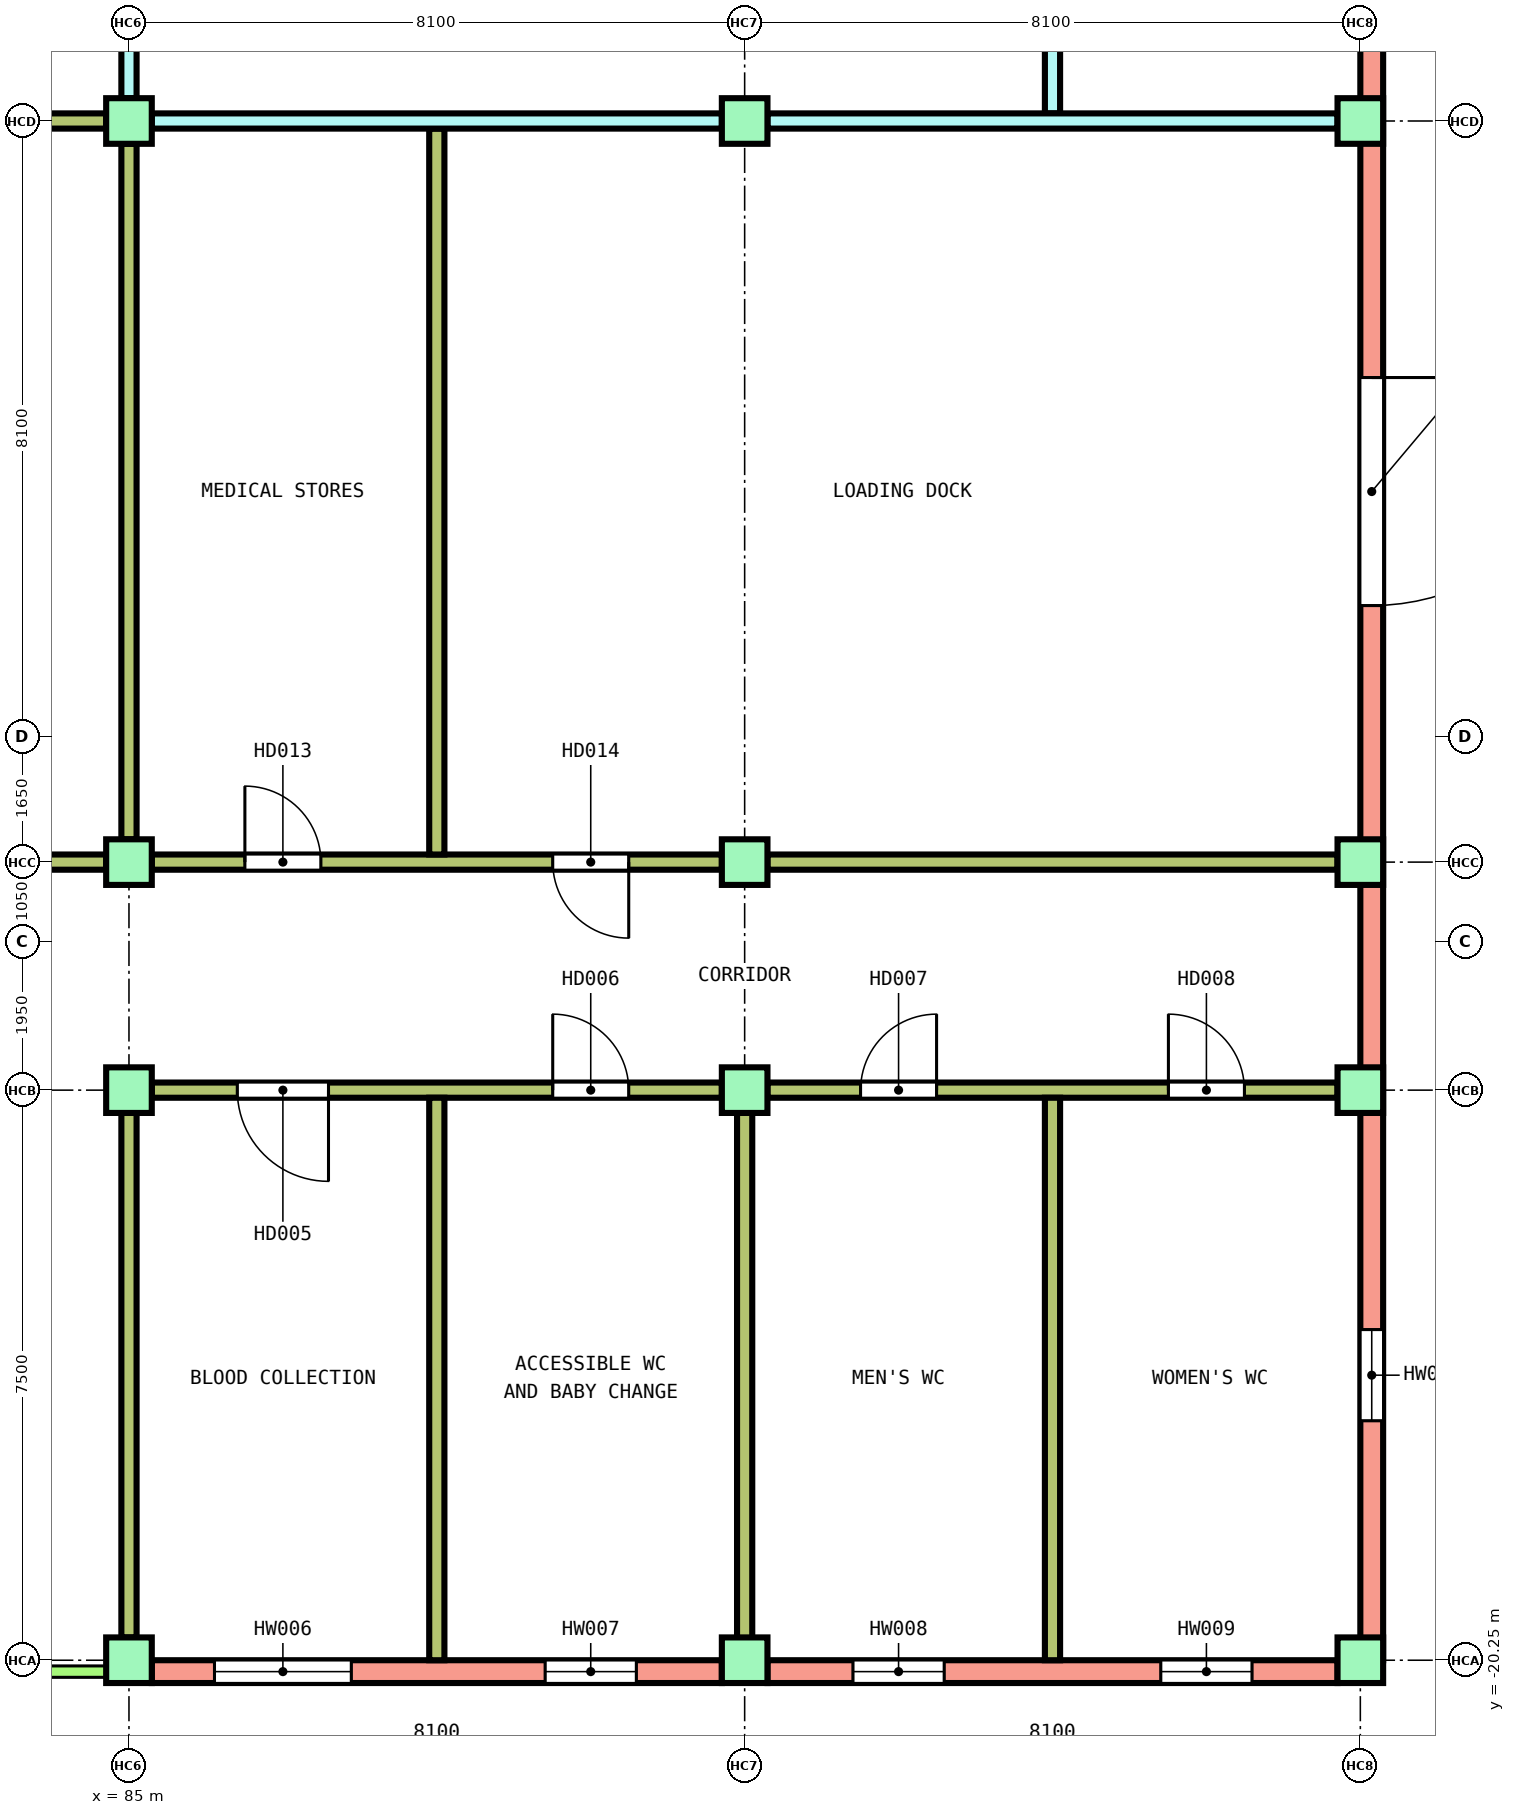
"""IFC4 building model, lengths in metres.
Left out: names, types, materials, properties, quantities, classifications, styles, units other than length and angle.
Written with IfcOpenShell. Run it as: python <this file> out.ifc"""

import sys

from ifc_helpers import new_model, si_unit, direction, frame, frame_2d, origin, origin_2d, place, context, subcontext, project, spatial, rectangle, extrude, element, fill, save


model = new_model("IFC4")
c1 = context("Model", 3, precision=1e-05, world=origin(), true_north=direction((0.0, 1.0)))
c2 = subcontext(c1, "Body", "Model", "MODEL_VIEW")
j1 = project(units=[si_unit("LENGTHUNIT", "METRE"), si_unit("PLANEANGLEUNIT", "RADIAN")], contexts=[c1])
p1 = place(None, origin())
s1 = spatial("IfcSite", under=j1, at=p1, CompositionType="ELEMENT")
p2 = place(p1, origin())
s2 = spatial("IfcBuilding", under=s1, at=p2, CompositionType="ELEMENT")
p3 = place(p2, origin())
s3 = spatial("IfcBuildingStorey", under=s2, at=p3, CompositionType="ELEMENT", Elevation=0.0)
for number, where, z_axis, x_axis in (
    (1, (85.0, -20.25, -0.25), (0.0, 0.0, 1.0), (1.0, 0.0, 0.0)),
    (2, (93.1, -20.25, -0.25), (0.0, 0.0, 1.0), (1.0, 0.0, 0.0)),
    (3, (101.2, -20.25, -0.25), (0.0, 0.0, 1.0), (1.0, 0.0, 0.0)),
    (4, (85.0, -12.75, -0.25), (0.0, 0.0, 1.0), (1.0, 0.0, 0.0)),
    (5, (93.1, -12.75, -0.25), (0.0, 0.0, 1.0), (1.0, 0.0, 0.0)),
    (6, (101.2, -12.75, -0.25), (0.0, 0.0, 1.0), (1.0, 0.0, 0.0)),
    (7, (85.0, -9.75, -0.25), (0.0, 0.0, 1.0), (1.0, 0.0, 0.0)),
    (8, (93.1, -9.75, -0.25), (0.0, 0.0, 1.0), (1.0, 0.0, 0.0)),
    (9, (101.2, -9.75, -0.25), (0.0, 0.0, 1.0), (1.0, 0.0, 0.0)),
    (10, (85.0, 0.0, -0.25), (0.0, 0.0, 1.0), (1.0, 0.0, 0.0)),
    (11, (93.1, 0.0, -0.25), (0.0, 0.0, 1.0), (1.0, 0.0, 0.0)),
    (12, (101.2, 0.0, -0.25), (0.0, 0.0, 1.0), (1.0, 0.0, 0.0)),
):
    element("IfcColumn", number, at=place(p3, frame(where, z_axis=z_axis, x_axis=x_axis)), inside=s3, PredefinedType="COLUMN", context=c2, shape_type="SweptSolid", body=[
        extrude(rectangle(XDim=0.6, YDim=0.6, at=origin_2d()), origin(), (0.0, 0.0, 1.0), 5.85),
    ])
p4 = place(p3, frame((85.3, -20.4, 0.0), z_axis=(0.0, 0.0, 1.0), x_axis=(1.0, 0.0, 0.0)))
e13 = element("IfcWall", 13, at=p4, inside=s3, PredefinedType="SOLIDWALL", context=c2, shape_type="SweptSolid", body=[
    extrude(rectangle(XDim=7.5, YDim=0.3, at=frame_2d((3.75, 0.0))), origin(), (0.0, 0.0, 1.0), 4.8),
])
p5 = place(p4, frame((0.825, 0.0, 0.9)))
e14 = element("IfcOpeningElement", 14, at=p5, cuts=e13, PredefinedType="OPENING", context=c2, shape_type="SweptSolid", body=[
    extrude(rectangle(XDim=1.8, YDim=1.8, at=frame_2d((0.9, 0.9))), frame((0.0, 0.16, 0.0), z_axis=(0.0, -1.0, 0.0), x_axis=(1.0, 0.0, 0.0)), (0.0, 0.0, 1.0), 0.32),
])
p6 = place(p4, frame((5.175, 0.0, 1.5)))
e15 = element("IfcOpeningElement", 15, at=p6, cuts=e13, PredefinedType="OPENING", context=c2, shape_type="SweptSolid", body=[
    extrude(rectangle(XDim=1.2, YDim=0.9, at=frame_2d((0.6, 0.45))), frame((0.0, 0.16, 0.0), z_axis=(0.0, -1.0, 0.0), x_axis=(1.0, 0.0, 0.0)), (0.0, 0.0, 1.0), 0.32),
])
p7 = place(p3, frame((93.4, -20.4, 0.0), z_axis=(0.0, 0.0, 1.0), x_axis=(1.0, 0.0, 0.0)))
e16 = element("IfcWall", 16, at=p7, inside=s3, PredefinedType="SOLIDWALL", context=c2, shape_type="SweptSolid", body=[
    extrude(rectangle(XDim=7.5, YDim=0.3, at=frame_2d((3.75, 0.0))), origin(), (0.0, 0.0, 1.0), 4.8),
])
p8 = place(p7, frame((1.125, 0.0, 1.5)))
e17 = element("IfcOpeningElement", 17, at=p8, cuts=e16, PredefinedType="OPENING", context=c2, shape_type="SweptSolid", body=[
    extrude(rectangle(XDim=1.2, YDim=0.9, at=frame_2d((0.6, 0.45))), frame((0.0, 0.16, 0.0), z_axis=(0.0, -1.0, 0.0), x_axis=(1.0, 0.0, 0.0)), (0.0, 0.0, 1.0), 0.32),
])
p9 = place(p7, frame((5.175, 0.0, 1.5)))
e18 = element("IfcOpeningElement", 18, at=p9, cuts=e16, PredefinedType="OPENING", context=c2, shape_type="SweptSolid", body=[
    extrude(rectangle(XDim=1.2, YDim=0.9, at=frame_2d((0.6, 0.45))), frame((0.0, 0.16, 0.0), z_axis=(0.0, -1.0, 0.0), x_axis=(1.0, 0.0, 0.0)), (0.0, 0.0, 1.0), 0.32),
])
p10 = place(p3, frame((85.3, -12.75, 0.0), z_axis=(0.0, 0.0, 1.0), x_axis=(1.0, 0.0, 0.0)))
e19 = element("IfcWall", 19, at=p10, inside=s3, PredefinedType="PARTITIONING", context=c2, shape_type="SweptSolid", body=[
    extrude(rectangle(XDim=7.5, YDim=0.2, at=frame_2d((3.75, 0.0))), origin(), (0.0, 0.0, 1.0), 4.8),
])
p11 = place(p10, frame((1.125, 0.0, 0.0)))
e20 = element("IfcOpeningElement", 20, at=p11, cuts=e19, PredefinedType="OPENING", context=c2, shape_type="SweptSolid", body=[
    extrude(rectangle(XDim=1.2, YDim=2.1, at=frame_2d((0.6, 1.05))), frame((0.0, 0.11, 0.0), z_axis=(0.0, -1.0, 0.0), x_axis=(1.0, 0.0, 0.0)), (0.0, 0.0, 1.0), 0.22),
])
p12 = place(p10, frame((5.275, 0.0, 0.0)))
e21 = element("IfcOpeningElement", 21, at=p12, cuts=e19, PredefinedType="OPENING", context=c2, shape_type="SweptSolid", body=[
    extrude(rectangle(XDim=1.0, YDim=2.1, at=frame_2d((0.5, 1.05))), frame((0.0, 0.11, 0.0), z_axis=(0.0, -1.0, 0.0), x_axis=(1.0, 0.0, 0.0)), (0.0, 0.0, 1.0), 0.22),
])
p13 = place(p3, frame((93.4, -12.75, 0.0), z_axis=(0.0, 0.0, 1.0), x_axis=(1.0, 0.0, 0.0)))
e22 = element("IfcWall", 22, at=p13, inside=s3, PredefinedType="PARTITIONING", context=c2, shape_type="SweptSolid", body=[
    extrude(rectangle(XDim=7.5, YDim=0.2, at=frame_2d((3.75, 0.0))), origin(), (0.0, 0.0, 1.0), 4.8),
])
p14 = place(p13, frame((1.225, 0.0, 0.0)))
e23 = element("IfcOpeningElement", 23, at=p14, cuts=e22, PredefinedType="OPENING", context=c2, shape_type="SweptSolid", body=[
    extrude(rectangle(XDim=1.0, YDim=2.1, at=frame_2d((0.5, 1.05))), frame((0.0, 0.11, 0.0), z_axis=(0.0, -1.0, 0.0), x_axis=(1.0, 0.0, 0.0)), (0.0, 0.0, 1.0), 0.22),
])
p15 = place(p13, frame((5.275, 0.0, 0.0)))
e24 = element("IfcOpeningElement", 24, at=p15, cuts=e22, PredefinedType="OPENING", context=c2, shape_type="SweptSolid", body=[
    extrude(rectangle(XDim=1.0, YDim=2.1, at=frame_2d((0.5, 1.05))), frame((0.0, 0.11, 0.0), z_axis=(0.0, -1.0, 0.0), x_axis=(1.0, 0.0, 0.0)), (0.0, 0.0, 1.0), 0.22),
])
p16 = place(p3, frame((77.2, -9.75, 0.0), z_axis=(0.0, 0.0, 1.0), x_axis=(1.0, 0.0, 0.0)))
e25 = element("IfcWall", 25, at=p16, inside=s3, PredefinedType="PARTITIONING", context=c2, shape_type="SweptSolid", body=[
    extrude(rectangle(XDim=7.5, YDim=0.2, at=frame_2d((3.75, 0.0))), origin(), (0.0, 0.0, 1.0), 4.8),
])
p17 = place(p16, frame((1.125, 0.0, 0.0)))
e26 = element("IfcOpeningElement", 26, at=p17, cuts=e25, PredefinedType="OPENING", context=c2, shape_type="SweptSolid", body=[
    extrude(rectangle(XDim=1.2, YDim=2.1, at=frame_2d((0.6, 1.05))), frame((0.0, 0.11, 0.0), z_axis=(0.0, -1.0, 0.0), x_axis=(1.0, 0.0, 0.0)), (0.0, 0.0, 1.0), 0.22),
])
p18 = place(p3, frame((85.3, -9.75, 0.0), z_axis=(0.0, 0.0, 1.0), x_axis=(1.0, 0.0, 0.0)))
e27 = element("IfcWall", 27, at=p18, inside=s3, PredefinedType="PARTITIONING", context=c2, shape_type="SweptSolid", body=[
    extrude(rectangle(XDim=7.5, YDim=0.2, at=frame_2d((3.75, 0.0))), origin(), (0.0, 0.0, 1.0), 4.8),
])
p19 = place(p18, frame((1.225, 0.0, 0.0)))
e28 = element("IfcOpeningElement", 28, at=p19, cuts=e27, PredefinedType="OPENING", context=c2, shape_type="SweptSolid", body=[
    extrude(rectangle(XDim=1.0, YDim=2.1, at=frame_2d((0.5, 1.05))), frame((0.0, 0.11, 0.0), z_axis=(0.0, -1.0, 0.0), x_axis=(1.0, 0.0, 0.0)), (0.0, 0.0, 1.0), 0.22),
])
p20 = place(p18, frame((5.275, 0.0, 0.0)))
e29 = element("IfcOpeningElement", 29, at=p20, cuts=e27, PredefinedType="OPENING", context=c2, shape_type="SweptSolid", body=[
    extrude(rectangle(XDim=1.0, YDim=2.1, at=frame_2d((0.5, 1.05))), frame((0.0, 0.11, 0.0), z_axis=(0.0, -1.0, 0.0), x_axis=(1.0, 0.0, 0.0)), (0.0, 0.0, 1.0), 0.22),
])
p21 = place(p3, frame((93.4, -9.75, 0.0), z_axis=(0.0, 0.0, 1.0), x_axis=(1.0, 0.0, 0.0)))
e30 = element("IfcWall", 30, at=p21, inside=s3, PredefinedType="PARTITIONING", context=c2, shape_type="SweptSolid", body=[
    extrude(rectangle(XDim=7.5, YDim=0.2, at=frame_2d((3.75, 0.0))), origin(), (0.0, 0.0, 1.0), 4.8),
])
p22 = place(p3, frame((85.0, -19.95, 0.0), z_axis=(0.0, 0.0, 1.0), x_axis=(0.0, 1.0, 0.0)))
e31 = element("IfcWall", 31, at=p22, inside=s3, PredefinedType="PARTITIONING", context=c2, shape_type="SweptSolid", body=[
    extrude(rectangle(XDim=6.9, YDim=0.2, at=frame_2d((3.45, 0.0))), origin(), (0.0, 0.0, 1.0), 4.8),
])
p23 = place(p3, frame((85.0, -9.45, 0.0), z_axis=(0.0, 0.0, 1.0), x_axis=(0.0, 1.0, 0.0)))
e32 = element("IfcWall", 32, at=p23, inside=s3, PredefinedType="PARTITIONING", context=c2, shape_type="SweptSolid", body=[
    extrude(rectangle(XDim=9.15, YDim=0.2, at=frame_2d((4.575, 0.0))), origin(), (0.0, 0.0, 1.0), 4.8),
])
p24 = place(p3, frame((85.0, 0.3, 0.0), z_axis=(0.0, 0.0, 1.0), x_axis=(0.0, 1.0, 0.0)))
e33 = element("IfcWall", 33, at=p24, inside=s3, PredefinedType="SOLIDWALL", context=c2, shape_type="SweptSolid", body=[
    extrude(rectangle(XDim=9.15, YDim=0.2, at=frame_2d((4.575, 0.0))), origin(), (0.0, 0.0, 1.0), 4.8),
])
p25 = place(p3, frame((89.05, -20.25, 0.0), z_axis=(0.0, 0.0, 1.0), x_axis=(0.0, 1.0, 0.0)))
e34 = element("IfcWall", 34, at=p25, inside=s3, PredefinedType="PARTITIONING", context=c2, shape_type="SweptSolid", body=[
    extrude(rectangle(XDim=7.4, YDim=0.2, at=frame_2d((3.7, 0.0))), origin(), (0.0, 0.0, 1.0), 4.8),
])
p26 = place(p3, frame((89.05, -9.65, 0.0), z_axis=(0.0, 0.0, 1.0), x_axis=(0.0, 1.0, 0.0)))
e35 = element("IfcWall", 35, at=p26, inside=s3, PredefinedType="PARTITIONING", context=c2, shape_type="SweptSolid", body=[
    extrude(rectangle(XDim=9.55, YDim=0.2, at=frame_2d((4.775, 0.0))), origin(), (0.0, 0.0, 1.0), 4.8),
])
p27 = place(p3, frame((93.1, -20.25, 0.0), z_axis=(0.0, 0.0, 1.0), x_axis=(0.0, 1.0, 0.0)))
e36 = element("IfcWall", 36, at=p27, inside=s3, PredefinedType="PARTITIONING", context=c2, shape_type="SweptSolid", body=[
    extrude(rectangle(XDim=7.5, YDim=0.2, at=frame_2d((3.75, 0.0))), origin(), (0.0, 0.0, 1.0), 4.8),
])
p28 = place(p3, frame((97.15, -20.25, 0.0), z_axis=(0.0, 0.0, 1.0), x_axis=(0.0, 1.0, 0.0)))
e37 = element("IfcWall", 37, at=p28, inside=s3, PredefinedType="PARTITIONING", context=c2, shape_type="SweptSolid", body=[
    extrude(rectangle(XDim=7.4, YDim=0.2, at=frame_2d((3.7, 0.0))), origin(), (0.0, 0.0, 1.0), 4.8),
])
p29 = place(p3, frame((97.15, 0.1, 0.0), z_axis=(0.0, 0.0, 1.0), x_axis=(0.0, 1.0, 0.0)))
e38 = element("IfcWall", 38, at=p29, inside=s3, PredefinedType="SOLIDWALL", context=c2, shape_type="SweptSolid", body=[
    extrude(rectangle(XDim=9.55, YDim=0.2, at=frame_2d((4.775, 0.0))), origin(), (0.0, 0.0, 1.0), 4.8),
])
p30 = place(p3, frame((101.35, 20.25, 0.0), z_axis=(0.0, 0.0, 1.0), x_axis=(0.0, -1.0, 0.0)))
e39 = element("IfcWall", 39, at=p30, inside=s3, PredefinedType="SOLIDWALL", context=c2, shape_type="SweptSolid", body=[
    extrude(rectangle(XDim=40.5, YDim=0.3, at=frame_2d((20.25, 0.0))), origin(), (0.0, 0.0, 1.0), 4.8),
])
p31 = place(p30, frame((5.73, 0.0, 0.0)))
e40 = element("IfcOpeningElement", 40, at=p31, cuts=e39, PredefinedType="OPENING", context=c2, shape_type="SweptSolid", body=[
    extrude(rectangle(XDim=1.2, YDim=2.1, at=frame_2d((0.6, 1.05))), frame((0.0, 0.16, 0.0), z_axis=(0.0, -1.0, 0.0), x_axis=(1.0, 0.0, 0.0)), (0.0, 0.0, 1.0), 0.32),
])
p32 = place(p30, frame((23.625, 0.0, 0.0)))
e41 = element("IfcOpeningElement", 41, at=p32, cuts=e39, PredefinedType="OPENING", context=c2, shape_type="SweptSolid", body=[
    extrude(rectangle(XDim=3.0, YDim=3.0, at=frame_2d((1.5, 1.5))), frame((0.0, 0.16, 0.0), z_axis=(0.0, -1.0, 0.0), x_axis=(1.0, 0.0, 0.0)), (0.0, 0.0, 1.0), 0.32),
])
p33 = place(p30, frame((36.15, 0.0, 1.5)))
e42 = element("IfcOpeningElement", 42, at=p33, cuts=e39, PredefinedType="OPENING", context=c2, shape_type="SweptSolid", body=[
    extrude(rectangle(XDim=1.2, YDim=0.9, at=frame_2d((0.6, 0.45))), frame((0.0, 0.16, 0.0), z_axis=(0.0, -1.0, 0.0), x_axis=(1.0, 0.0, 0.0)), (0.0, 0.0, 1.0), 0.32),
])
p34 = place(p30, frame((14.775, 0.0, 1.5)))
e43 = element("IfcOpeningElement", 43, at=p34, cuts=e39, PredefinedType="OPENING", context=c2, shape_type="SweptSolid", body=[
    extrude(rectangle(XDim=1.2, YDim=0.9, at=frame_2d((0.6, 0.45))), frame((0.0, 0.16, 0.0), z_axis=(0.0, -1.0, 0.0), x_axis=(1.0, 0.0, 0.0)), (0.0, 0.0, 1.0), 0.32),
])
p35 = place(p3, frame((77.2, 0.0, 0.0), z_axis=(0.0, 0.0, 1.0), x_axis=(1.0, 0.0, 0.0)))
e44 = element("IfcWall", 44, at=p35, inside=s3, PredefinedType="PARTITIONING", context=c2, shape_type="SweptSolid", body=[
    extrude(rectangle(XDim=7.5, YDim=0.2, at=frame_2d((3.75, 0.0))), origin(), (0.0, 0.0, 1.0), 4.8),
])
for number, where, z_axis, x_axis in (
    (45, (85.3, 0.0, 0.0), (0.0, 0.0, 1.0), (1.0, 0.0, 0.0)),
    (46, (93.4, 0.0, 0.0), (0.0, 0.0, 1.0), (1.0, 0.0, 0.0)),
):
    element("IfcWall", number, at=place(p3, frame(where, z_axis=z_axis, x_axis=x_axis)), inside=s3, PredefinedType="SOLIDWALL", context=c2, shape_type="SweptSolid", body=[
        extrude(rectangle(XDim=7.5, YDim=0.2, at=frame_2d((3.75, 0.0))), origin(), (0.0, 0.0, 1.0), 4.8),
    ])
p36 = place(p11, origin())
e47 = element("IfcDoor", 47, at=p36, inside=s3, OperationType="SINGLE_SWING_RIGHT", PredefinedType="DOOR", context=c2, shape_type="SweptSolid", body=[
    extrude(rectangle(XDim=1.2, YDim=2.1, at=frame_2d((0.6, 1.05))), frame((0.0, 0.025, 0.0), z_axis=(0.0, -1.0, 0.0), x_axis=(1.0, 0.0, 0.0)), (0.0, 0.0, 1.0), 0.05),
])
fill(e20, e47)
p37 = place(p12, origin())
e48 = element("IfcDoor", 48, at=p37, inside=s3, OperationType="SINGLE_SWING_LEFT", PredefinedType="DOOR", context=c2, shape_type="SweptSolid", body=[
    extrude(rectangle(XDim=1.0, YDim=2.1, at=frame_2d((0.5, 1.05))), frame((0.0, 0.025, 0.0), z_axis=(0.0, -1.0, 0.0), x_axis=(1.0, 0.0, 0.0)), (0.0, 0.0, 1.0), 0.05),
])
fill(e21, e48)
p38 = place(p14, origin())
e49 = element("IfcDoor", 49, at=p38, inside=s3, OperationType="SINGLE_SWING_RIGHT", PredefinedType="DOOR", context=c2, shape_type="SweptSolid", body=[
    extrude(rectangle(XDim=1.0, YDim=2.1, at=frame_2d((0.5, 1.05))), frame((0.0, 0.025, 0.0), z_axis=(0.0, -1.0, 0.0), x_axis=(1.0, 0.0, 0.0)), (0.0, 0.0, 1.0), 0.05),
])
fill(e23, e49)
p39 = place(p15, origin())
e50 = element("IfcDoor", 50, at=p39, inside=s3, OperationType="SINGLE_SWING_LEFT", PredefinedType="DOOR", context=c2, shape_type="SweptSolid", body=[
    extrude(rectangle(XDim=1.0, YDim=2.1, at=frame_2d((0.5, 1.05))), frame((0.0, 0.025, 0.0), z_axis=(0.0, -1.0, 0.0), x_axis=(1.0, 0.0, 0.0)), (0.0, 0.0, 1.0), 0.05),
])
fill(e24, e50)
p40 = place(p19, origin())
e51 = element("IfcDoor", 51, at=p40, inside=s3, OperationType="SINGLE_SWING_RIGHT", PredefinedType="DOOR", context=c2, shape_type="SweptSolid", body=[
    extrude(rectangle(XDim=1.0, YDim=2.1, at=frame_2d((0.5, 1.05))), frame((0.0, 0.025, 0.0), z_axis=(0.0, -1.0, 0.0), x_axis=(1.0, 0.0, 0.0)), (0.0, 0.0, 1.0), 0.05),
])
fill(e28, e51)
p41 = place(p20, origin())
e52 = element("IfcDoor", 52, at=p41, inside=s3, OperationType="SINGLE_SWING_LEFT", PredefinedType="DOOR", context=c2, shape_type="SweptSolid", body=[
    extrude(rectangle(XDim=1.0, YDim=2.1, at=frame_2d((0.5, 1.05))), frame((0.0, 0.025, 0.0), z_axis=(0.0, -1.0, 0.0), x_axis=(1.0, 0.0, 0.0)), (0.0, 0.0, 1.0), 0.05),
])
fill(e29, e52)
p42 = place(p32, origin())
e53 = element("IfcDoor", 53, at=p42, inside=s3, OperationType="ROLLINGUP", PredefinedType="DOOR", context=c2, shape_type="SweptSolid", body=[
    extrude(rectangle(XDim=3.0, YDim=3.0, at=frame_2d((1.5, 1.5))), frame((0.0, 0.025, 0.0), z_axis=(0.0, -1.0, 0.0), x_axis=(1.0, 0.0, 0.0)), (0.0, 0.0, 1.0), 0.05),
])
fill(e41, e53)
p43 = place(p5, origin())
e54 = element("IfcWindow", 54, at=p43, inside=s3, PartitioningType="SINGLE_PANEL", PredefinedType="WINDOW", context=c2, shape_type="SweptSolid", body=[
    extrude(rectangle(XDim=1.8, YDim=1.8, at=frame_2d((0.9, 0.9))), frame((0.0, 0.03, 0.0), z_axis=(0.0, -1.0, 0.0), x_axis=(1.0, 0.0, 0.0)), (0.0, 0.0, 1.0), 0.06),
])
fill(e14, e54)
p44 = place(p6, origin())
e55 = element("IfcWindow", 55, at=p44, inside=s3, PartitioningType="SINGLE_PANEL", PredefinedType="WINDOW", context=c2, shape_type="SweptSolid", body=[
    extrude(rectangle(XDim=1.2, YDim=0.9, at=frame_2d((0.6, 0.45))), frame((0.0, 0.03, 0.0), z_axis=(0.0, -1.0, 0.0), x_axis=(1.0, 0.0, 0.0)), (0.0, 0.0, 1.0), 0.06),
])
fill(e15, e55)
p45 = place(p8, origin())
e56 = element("IfcWindow", 56, at=p45, inside=s3, PartitioningType="SINGLE_PANEL", PredefinedType="WINDOW", context=c2, shape_type="SweptSolid", body=[
    extrude(rectangle(XDim=1.2, YDim=0.9, at=frame_2d((0.6, 0.45))), frame((0.0, 0.03, 0.0), z_axis=(0.0, -1.0, 0.0), x_axis=(1.0, 0.0, 0.0)), (0.0, 0.0, 1.0), 0.06),
])
fill(e17, e56)
p46 = place(p9, origin())
e57 = element("IfcWindow", 57, at=p46, inside=s3, PartitioningType="SINGLE_PANEL", PredefinedType="WINDOW", context=c2, shape_type="SweptSolid", body=[
    extrude(rectangle(XDim=1.2, YDim=0.9, at=frame_2d((0.6, 0.45))), frame((0.0, 0.03, 0.0), z_axis=(0.0, -1.0, 0.0), x_axis=(1.0, 0.0, 0.0)), (0.0, 0.0, 1.0), 0.06),
])
fill(e18, e57)
p47 = place(p33, origin())
e58 = element("IfcWindow", 58, at=p47, inside=s3, PartitioningType="SINGLE_PANEL", PredefinedType="WINDOW", context=c2, shape_type="SweptSolid", body=[
    extrude(rectangle(XDim=1.2, YDim=0.9, at=frame_2d((0.6, 0.45))), frame((0.0, 0.03, 0.0), z_axis=(0.0, -1.0, 0.0), x_axis=(1.0, 0.0, 0.0)), (0.0, 0.0, 1.0), 0.06),
])
fill(e42, e58)
save(model, sys.argv[1])
